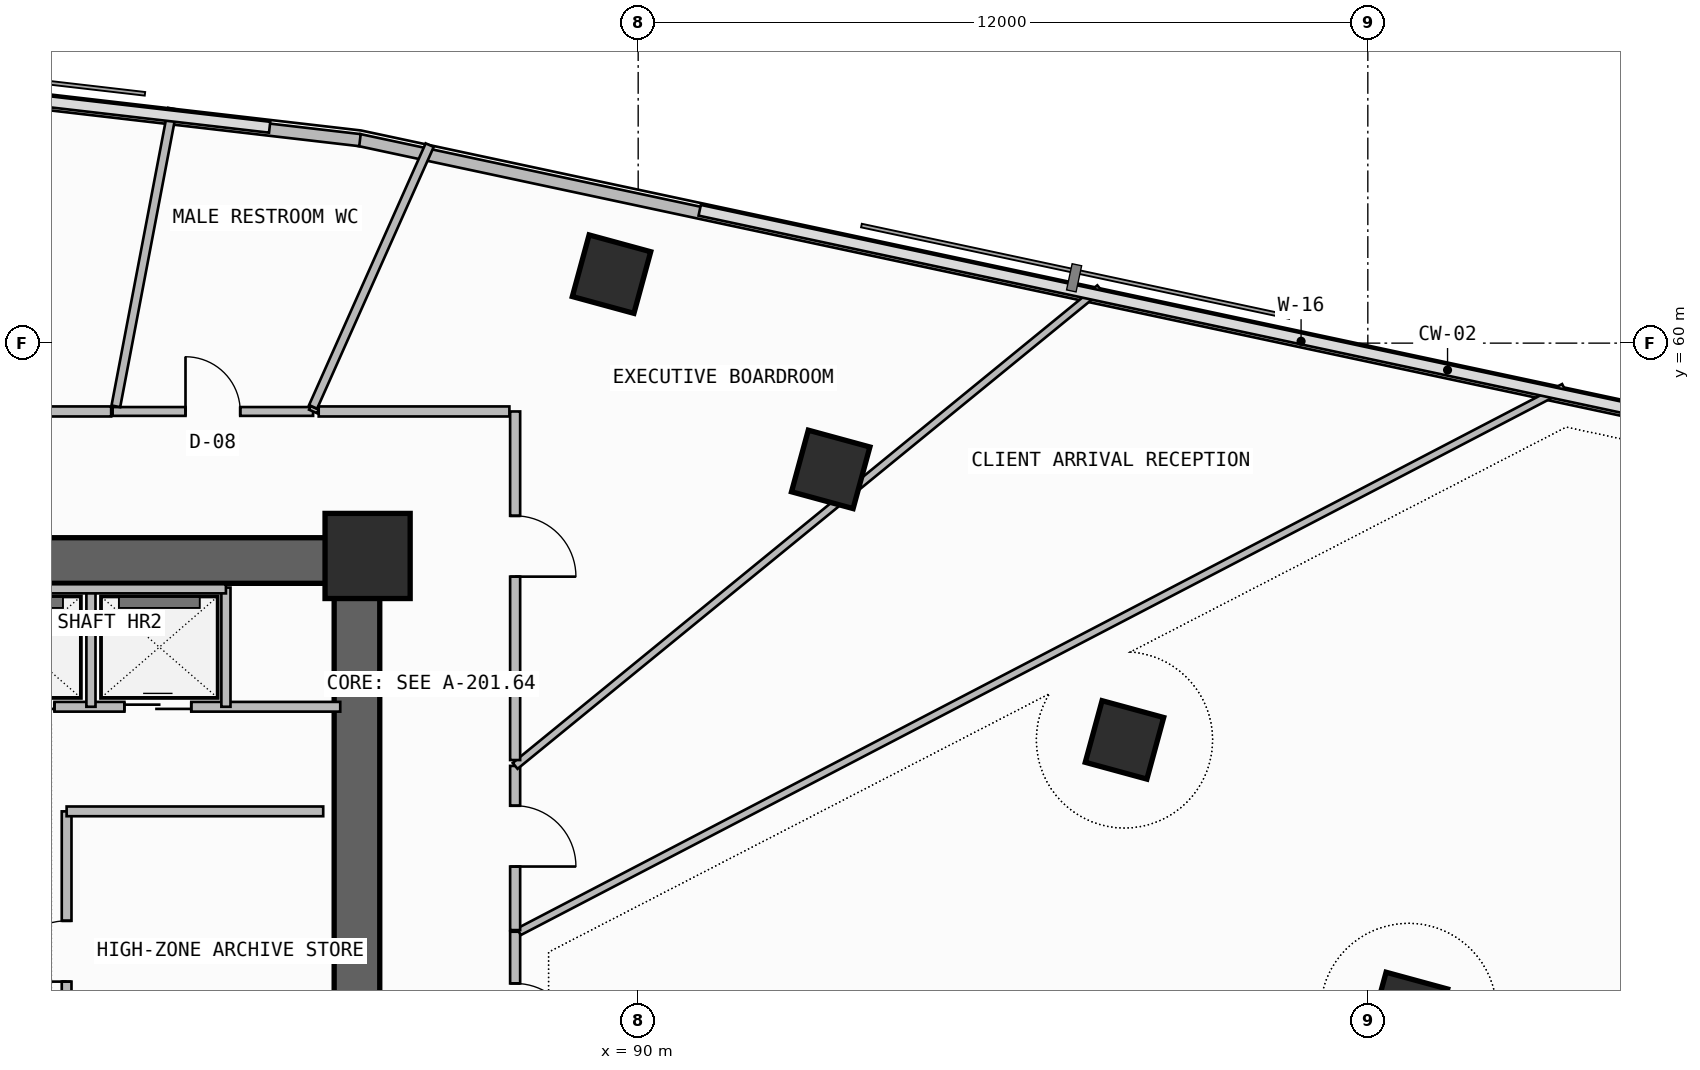
"""IFC4 building model, lengths in metres.
Left out: names, types, materials, properties, quantities, classifications, styles, units other than length and angle.
Written with IfcOpenShell. Run it as: python <this file> out.ifc"""

import sys

from ifc_helpers import new_model, si_unit, direction, frame, frame_2d, origin, origin_2d, place, context, subcontext, project, spatial, rectangle, extrude, element, fill, save


model = new_model("IFC4")
c1 = context("Model", 3, precision=1e-05, world=origin(), true_north=direction((0.0, 1.0)))
c2 = subcontext(c1, "Body", "Model", "MODEL_VIEW")
j1 = project(units=[si_unit("LENGTHUNIT", "METRE"), si_unit("PLANEANGLEUNIT", "RADIAN")], contexts=[c1])
p1 = place(None, origin())
s1 = spatial("IfcSite", under=j1, at=p1, CompositionType="ELEMENT")
p2 = place(p1, origin())
s2 = spatial("IfcBuilding", under=s1, at=p2, CompositionType="ELEMENT")
p3 = place(p2, frame((0.0, 0.0, 229.06)))
s3 = spatial("IfcBuildingStorey", under=s2, at=p3, CompositionType="ELEMENT", Elevation=229.06)
p4 = place(p3, frame((72.0, 56.425, -0.26), z_axis=(0.0, 0.0, 1.0), x_axis=(1.0, 0.0, 0.0)))
e1 = element("IfcWall", 1, at=p4, inside=s3, PredefinedType="SHEAR", context=c2, shape_type="SweptSolid", body=[
    extrude(rectangle(XDim=13.75, YDim=0.75, at=frame_2d((6.875, 0.0))), origin(), (0.0, 0.0, 1.0), 3.52),
])
p5 = place(p3, frame((85.375, 47.6, -0.26), z_axis=(0.0, 0.0, 1.0), x_axis=(0.0, 1.0, 0.0)))
e2 = element("IfcWall", 2, at=p5, inside=s3, PredefinedType="SHEAR", context=c2, shape_type="SweptSolid", body=[
    extrude(rectangle(XDim=8.45, YDim=0.75, at=frame_2d((4.225, 0.0))), origin(), (0.0, 0.0, 1.0), 3.52),
])
p6 = place(p3, frame((85.55, 56.5, 0.0), z_axis=(0.0, 0.0, 1.0), x_axis=(1.0, 0.0, 0.0)))
e3 = element("IfcColumn", 3, at=p6, inside=s3, PredefinedType="COLUMN", context=c2, shape_type="SweptSolid", body=[
    extrude(rectangle(XDim=1.4, YDim=1.4, at=origin_2d()), origin(), (0.0, 0.0, 1.0), 3.52),
])
for number, where, z_axis, x_axis in (
    (4, (102.669, 49.01, 0.0), (0.0, 0.0, 1.0), (0.263, 0.965, 0.0)),
    (5, (97.998, 53.475, 0.0), (0.0, 0.0, 1.0), (0.263, 0.965, 0.0)),
    (6, (93.167, 57.924, 0.0), (0.0, 0.0, 1.0), (0.263, 0.965, 0.0)),
    (7, (89.562, 61.135, 0.0), (0.0, 0.0, 1.0), (0.263, 0.965, 0.0)),
):
    element("IfcColumn", number, at=place(p3, frame(where, z_axis=z_axis, x_axis=x_axis)), inside=s3, PredefinedType="COLUMN", context=c2, shape_type="SweptSolid", body=[
        extrude(rectangle(XDim=1.05, YDim=1.05, at=origin_2d()), origin(), (0.0, 0.0, 1.0), 3.52),
    ])
p7 = place(p3, frame((104.791, 47.25, 0.0), z_axis=(0.0, 0.0, 1.0), x_axis=(0.868193423982, 0.496225934987, 0.0)))
e8 = element("IfcWall", 8, at=p7, inside=s3, PredefinedType="SOLIDWALL", context=c2, shape_type="SweptSolid", body=[
    extrude(rectangle(XDim=12.995, YDim=0.42, at=frame_2d((6.498, 0.0))), origin(), (0.0, 0.0, 1.0), 2.237),
])
p8 = place(p7, frame((7.31, 0.0, 0.957)))
e9 = element("IfcOpeningElement", 9, at=p8, cuts=e8, PredefinedType="OPENING", context=c2, shape_type="SweptSolid", body=[
    extrude(rectangle(XDim=2.4, YDim=1.2, at=frame_2d((1.2, 0.6))), frame((0.0, 0.22, 0.0), z_axis=(0.0, -1.0, 0.0), x_axis=(1.0, 0.0, 0.0)), (0.0, 0.0, 1.0), 0.44),
])
p9 = place(p3, frame((116.396, 56.722, 0.0), z_axis=(0.0, 0.0, 1.0), x_axis=(-0.977936620644, 0.208901809478, 0.0)))
e10 = element("IfcWall", 10, at=p9, inside=s3, PredefinedType="PARAPET", context=c2, shape_type="SweptSolid", body=[
    extrude(rectangle(XDim=31.685, YDim=0.2, at=frame_2d((15.843, 0.0))), origin(), (0.0, 0.0, 1.0), 1.15),
])
p10 = place(p3, frame((85.424, 63.338, 0.0), z_axis=(0.0, 0.0, 1.0), x_axis=(-0.993364714048, 0.115006716693, 0.0)))
e11 = element("IfcWall", 11, at=p10, inside=s3, PredefinedType="PARAPET", context=c2, shape_type="SweptSolid", body=[
    extrude(rectangle(XDim=26.302, YDim=0.2, at=frame_2d((13.151, 0.0))), origin(), (0.0, 0.0, 1.0), 1.15),
])
p11 = place(p3, frame((80.6, 47.7, 0.0), z_axis=(0.0, 0.0, 1.0), x_axis=(0.0, 1.0, 0.0)))
e12 = element("IfcWall", 12, at=p11, inside=s3, PredefinedType="SOLIDWALL", context=c2, shape_type="SweptSolid", body=[
    extrude(rectangle(XDim=4.6, YDim=0.16, at=frame_2d((2.3, 0.0))), origin(), (0.0, 0.0, 1.0), 3.26),
])
p12 = place(p11, frame((1.8, 0.0, 0.0)))
e13 = element("IfcOpeningElement", 13, at=p12, cuts=e12, PredefinedType="OPENING", context=c2, shape_type="SweptSolid", body=[
    extrude(rectangle(XDim=1.0, YDim=2.2, at=frame_2d((0.5, 1.1))), frame((0.0, 0.09, 0.0), z_axis=(0.0, -1.0, 0.0), x_axis=(1.0, 0.0, 0.0)), (0.0, 0.0, 1.0), 0.18),
])
p13 = place(p3, frame((80.6, 52.3, 0.0), z_axis=(0.0, 0.0, 1.0), x_axis=(1.0, 0.0, 0.0)))
e14 = element("IfcWall", 14, at=p13, inside=s3, PredefinedType="SOLIDWALL", context=c2, shape_type="SweptSolid", body=[
    extrude(rectangle(XDim=4.22, YDim=0.16, at=frame_2d((2.11, 0.0))), origin(), (0.0, 0.0, 1.0), 3.26),
])
p14 = place(p3, frame((73.02, 54.02, 0.0), z_axis=(0.0, 0.0, 1.0), x_axis=(1.0, 0.0, 0.0)))
e15 = element("IfcWall", 15, at=p14, inside=s3, PredefinedType="SOLIDWALL", context=c2, shape_type="SweptSolid", body=[
    extrude(rectangle(XDim=12.08, YDim=0.16, at=frame_2d((6.04, 0.0))), origin(), (0.0, 0.0, 1.0), 3.26),
])
p15 = place(p14, frame((4.03, 0.0, 0.0)))
e16 = element("IfcOpeningElement", 16, at=p15, cuts=e15, PredefinedType="OPENING", context=c2, shape_type="SweptSolid", body=[
    extrude(rectangle(XDim=1.1, YDim=2.25, at=frame_2d((0.55, 1.125))), frame((0.0, 0.09, 0.0), z_axis=(0.0, -1.0, 0.0), x_axis=(1.0, 0.0, 0.0)), (0.0, 0.0, 1.0), 0.18),
])
p16 = place(p14, frame((6.28, 0.0, 0.0)))
e17 = element("IfcOpeningElement", 17, at=p16, cuts=e15, PredefinedType="OPENING", context=c2, shape_type="SweptSolid", body=[
    extrude(rectangle(XDim=1.1, YDim=2.25, at=frame_2d((0.55, 1.125))), frame((0.0, 0.09, 0.0), z_axis=(0.0, -1.0, 0.0), x_axis=(1.0, 0.0, 0.0)), (0.0, 0.0, 1.0), 0.18),
])
p17 = place(p14, frame((8.53, 0.0, 0.0)))
e18 = element("IfcOpeningElement", 18, at=p17, cuts=e15, PredefinedType="OPENING", context=c2, shape_type="SweptSolid", body=[
    extrude(rectangle(XDim=1.1, YDim=2.25, at=frame_2d((0.55, 1.125))), frame((0.0, 0.09, 0.0), z_axis=(0.0, -1.0, 0.0), x_axis=(1.0, 0.0, 0.0)), (0.0, 0.0, 1.0), 0.18),
])
p18 = place(p3, frame((81.0, 54.02, 0.0), z_axis=(0.0, 0.0, 1.0), x_axis=(0.0, 1.0, 0.0)))
e19 = element("IfcWall", 19, at=p18, inside=s3, PredefinedType="PLUMBINGWALL", context=c2, shape_type="SweptSolid", body=[
    extrude(rectangle(XDim=1.96, YDim=0.15, at=frame_2d((0.98, 0.0))), origin(), (0.0, 0.0, 1.0), 3.26),
])
p19 = place(p3, frame((83.22, 54.02, 0.0), z_axis=(0.0, 0.0, 1.0), x_axis=(0.0, 1.0, 0.0)))
e20 = element("IfcWall", 20, at=p19, inside=s3, PredefinedType="SOLIDWALL", context=c2, shape_type="SweptSolid", body=[
    extrude(rectangle(XDim=1.96, YDim=0.15, at=frame_2d((0.98, 0.0))), origin(), (0.0, 0.0, 1.0), 3.26),
])
p20 = place(p3, frame((76.52, 55.96, 0.0), z_axis=(0.0, 0.0, 1.0), x_axis=(1.0, 0.0, 0.0)))
e21 = element("IfcWall", 21, at=p20, inside=s3, PredefinedType="SOLIDWALL", context=c2, shape_type="SweptSolid", body=[
    extrude(rectangle(XDim=6.7, YDim=0.15, at=frame_2d((3.35, 0.0))), origin(), (0.0, 0.0, 1.0), 3.26),
])
p21 = place(p3, frame((87.976, 47.62, 0.0), z_axis=(0.0, 0.0, 1.0), x_axis=(0.0, 1.0, 0.0)))
e22 = element("IfcWall", 22, at=p21, inside=s3, PredefinedType="PARTITIONING", context=c2, shape_type="SweptSolid", body=[
    extrude(rectangle(XDim=2.7, YDim=0.165, at=frame_2d((1.35, 0.0))), origin(), (0.0, 0.0, 1.0), 3.26),
])
p22 = place(p21, frame((0.85, 0.0, 0.0)))
e23 = element("IfcOpeningElement", 23, at=p22, cuts=e22, PredefinedType="OPENING", context=c2, shape_type="SweptSolid", body=[
    extrude(rectangle(XDim=1.0, YDim=2.2, at=frame_2d((0.5, 1.1))), frame((0.0, 0.093, 0.0), z_axis=(0.0, -1.0, 0.0), x_axis=(1.0, 0.0, 0.0)), (0.0, 0.0, 1.0), 0.185),
])
p23 = place(p3, frame((88.04, 50.32, 0.0), z_axis=(0.0, 0.0, 1.0), x_axis=(0.886887733798, 0.461985008023, 0.0)))
e24 = element("IfcWall", 24, at=p23, inside=s3, PredefinedType="PARTITIONING", context=c2, shape_type="SweptSolid", body=[
    extrude(rectangle(XDim=19.376, YDim=0.125, at=frame_2d((9.688, 0.0))), origin(), (0.0, 0.0, 1.0), 2.237),
])
p24 = place(p3, frame((87.976, 50.347, 0.0), z_axis=(0.0, 0.0, 1.0), x_axis=(0.0, 1.0, 0.0)))
e25 = element("IfcWall", 25, at=p24, inside=s3, PredefinedType="PARTITIONING", context=c2, shape_type="SweptSolid", body=[
    extrude(rectangle(XDim=2.7, YDim=0.165, at=frame_2d((1.35, 0.0))), origin(), (0.0, 0.0, 1.0), 3.26),
])
p25 = place(p24, frame((1.045, 0.0, 0.0)))
e26 = element("IfcOpeningElement", 26, at=p25, cuts=e25, PredefinedType="OPENING", context=c2, shape_type="SweptSolid", body=[
    extrude(rectangle(XDim=1.0, YDim=2.2, at=frame_2d((0.5, 1.1))), frame((0.0, 0.093, 0.0), z_axis=(0.0, -1.0, 0.0), x_axis=(1.0, 0.0, 0.0)), (0.0, 0.0, 1.0), 0.185),
])
p26 = place(p3, frame((87.976, 53.048, 0.0), z_axis=(0.0, 0.0, 1.0), x_axis=(0.774410079036, 0.632683988645, 0.0)))
e27 = element("IfcWall", 27, at=p26, inside=s3, PredefinedType="PARTITIONING", context=c2, shape_type="SweptSolid", body=[
    extrude(rectangle(XDim=12.415, YDim=0.125, at=frame_2d((6.208, 0.0))), origin(), (0.0, 0.0, 1.0), 2.237),
])
p27 = place(p3, frame((84.654, 58.876, 0.0), z_axis=(0.0, 0.0, 1.0), x_axis=(-1.0, 0.0, 0.0)))
e28 = element("IfcWall", 28, at=p27, inside=s3, PredefinedType="PARTITIONING", context=c2, shape_type="SweptSolid", body=[
    extrude(rectangle(XDim=3.297, YDim=0.145, at=frame_2d((1.648, 0.0))), origin(), (0.0, 0.0, 1.0), 3.26),
])
p28 = place(p27, frame((1.198, 0.0, 0.0)))
e29 = element("IfcOpeningElement", 29, at=p28, cuts=e28, PredefinedType="OPENING", context=c2, shape_type="SweptSolid", body=[
    extrude(rectangle(XDim=0.9, YDim=2.1, at=frame_2d((0.45, 1.05))), frame((0.0, 0.083, 0.0), z_axis=(0.0, -1.0, 0.0), x_axis=(1.0, 0.0, 0.0)), (0.0, 0.0, 1.0), 0.165),
])
p29 = place(p3, frame((84.68, 58.936, 0.0), z_axis=(0.0, 0.0, 1.0), x_axis=(-0.403364333628, -0.915039460546, 0.0)))
e30 = element("IfcWall", 30, at=p29, inside=s3, PredefinedType="PARTITIONING", context=c2, shape_type="SweptSolid", body=[
    extrude(rectangle(XDim=0.065, YDim=0.145, at=frame_2d((0.033, 0.0))), origin(), (0.0, 0.0, 1.0), 3.26),
])
p30 = place(p3, frame((86.571, 63.256, 0.0), z_axis=(0.0, 0.0, 1.0), x_axis=(-0.406936332394, -0.913456524077, 0.0)))
e31 = element("IfcWall", 31, at=p30, inside=s3, PredefinedType="PARTITIONING", context=c2, shape_type="SweptSolid", body=[
    extrude(rectangle(XDim=4.712, YDim=0.145, at=frame_2d((2.356, 0.0))), origin(), (0.0, 0.0, 1.0), 3.26),
])
p31 = place(p3, frame((81.41, 58.961, 0.0), z_axis=(0.0, 0.0, 1.0), x_axis=(0.187053573784, 0.982349713969, 0.0)))
e32 = element("IfcWall", 32, at=p31, inside=s3, PredefinedType="PARTITIONING", context=c2, shape_type="SweptSolid", body=[
    extrude(rectangle(XDim=4.983, YDim=0.145, at=frame_2d((2.492, 0.0))), origin(), (0.0, 0.0, 1.0), 3.26),
])
p32 = place(p3, frame((87.976, 53.144, 0.0), z_axis=(0.0, 0.0, 1.0), x_axis=(0.0, 1.0, 0.0)))
e33 = element("IfcWall", 33, at=p32, inside=s3, PredefinedType="PARTITIONING", context=c2, shape_type="SweptSolid", body=[
    extrude(rectangle(XDim=5.733, YDim=0.165, at=frame_2d((2.866, 0.0))), origin(), (0.0, 0.0, 1.0), 2.237),
])
p33 = place(p32, frame((3.016, 0.0, 0.0)))
e34 = element("IfcOpeningElement", 34, at=p33, cuts=e33, PredefinedType="OPENING", context=c2, shape_type="SweptSolid", body=[
    extrude(rectangle(XDim=1.0, YDim=2.2, at=frame_2d((0.5, 1.1))), frame((0.0, 0.093, 0.0), z_axis=(0.0, -1.0, 0.0), x_axis=(1.0, 0.0, 0.0)), (0.0, 0.0, 1.0), 0.185),
])
p34 = place(p3, frame((87.882, 58.876, 0.0), z_axis=(0.0, 0.0, 1.0), x_axis=(-1.0, 0.0, 0.0)))
e35 = element("IfcWall", 35, at=p34, inside=s3, PredefinedType="PARTITIONING", context=c2, shape_type="SweptSolid", body=[
    extrude(rectangle(XDim=3.136, YDim=0.165, at=frame_2d((1.568, 0.0))), origin(), (0.0, 0.0, 1.0), 2.237),
])
p35 = place(p3, frame((81.333, 58.876, 0.0), z_axis=(0.0, 0.0, 1.0), x_axis=(-1.0, 0.0, 0.0)))
e36 = element("IfcWall", 36, at=p35, inside=s3, PredefinedType="PARTITIONING", context=c2, shape_type="SweptSolid", body=[
    extrude(rectangle(XDim=1.588, YDim=0.165, at=frame_2d((0.794, 0.0))), origin(), (0.0, 0.0, 1.0), 3.26),
])
p36 = place(p12, origin())
e37 = element("IfcDoor", 37, at=p36, inside=s3, OperationType="SINGLE_SWING_LEFT", PredefinedType="DOOR", context=c2, shape_type="SweptSolid", body=[
    extrude(rectangle(XDim=1.0, YDim=2.2, at=frame_2d((0.5, 1.1))), frame((0.0, 0.025, 0.0), z_axis=(0.0, -1.0, 0.0), x_axis=(1.0, 0.0, 0.0)), (0.0, 0.0, 1.0), 0.05),
])
fill(e13, e37)
p37 = place(p16, origin())
e38 = element("IfcDoor", 38, at=p37, inside=s3, OperationType="DOUBLE_DOOR_SLIDING", PredefinedType="DOOR", context=c2, shape_type="SweptSolid", body=[
    extrude(rectangle(XDim=1.1, YDim=2.25, at=frame_2d((0.55, 1.125))), frame((0.0, 0.025, 0.0), z_axis=(0.0, -1.0, 0.0), x_axis=(1.0, 0.0, 0.0)), (0.0, 0.0, 1.0), 0.05),
])
fill(e17, e38)
p38 = place(p17, origin())
e39 = element("IfcDoor", 39, at=p38, inside=s3, OperationType="DOUBLE_DOOR_SLIDING", PredefinedType="DOOR", context=c2, shape_type="SweptSolid", body=[
    extrude(rectangle(XDim=1.1, YDim=2.25, at=frame_2d((0.55, 1.125))), frame((0.0, 0.025, 0.0), z_axis=(0.0, -1.0, 0.0), x_axis=(1.0, 0.0, 0.0)), (0.0, 0.0, 1.0), 0.05),
])
fill(e18, e39)
p39 = place(p22, frame((1.0, 0.0, 0.0), z_axis=(0.0, 0.0, 1.0), x_axis=(-1.0, 0.0, 0.0)))
e40 = element("IfcDoor", 40, at=p39, inside=s3, OperationType="SINGLE_SWING_RIGHT", PredefinedType="DOOR", context=c2, shape_type="SweptSolid", body=[
    extrude(rectangle(XDim=1.0, YDim=2.2, at=frame_2d((0.5, 1.1))), frame((0.0, 0.025, 0.0), z_axis=(0.0, -1.0, 0.0), x_axis=(1.0, 0.0, 0.0)), (0.0, 0.0, 1.0), 0.05),
])
fill(e23, e40)
p40 = place(p25, frame((1.0, 0.0, 0.0), z_axis=(0.0, 0.0, 1.0), x_axis=(-1.0, 0.0, 0.0)))
e41 = element("IfcDoor", 41, at=p40, inside=s3, OperationType="SINGLE_SWING_RIGHT", PredefinedType="DOOR", context=c2, shape_type="SweptSolid", body=[
    extrude(rectangle(XDim=1.0, YDim=2.2, at=frame_2d((0.5, 1.1))), frame((0.0, 0.025, 0.0), z_axis=(0.0, -1.0, 0.0), x_axis=(1.0, 0.0, 0.0)), (0.0, 0.0, 1.0), 0.05),
])
fill(e26, e41)
p41 = place(p28, frame((0.9, 0.0, 0.0), z_axis=(0.0, 0.0, 1.0), x_axis=(-1.0, 0.0, 0.0)))
e42 = element("IfcDoor", 42, at=p41, inside=s3, OperationType="SINGLE_SWING_LEFT", PredefinedType="DOOR", context=c2, shape_type="SweptSolid", body=[
    extrude(rectangle(XDim=0.9, YDim=2.1, at=frame_2d((0.45, 1.05))), frame((0.0, 0.025, 0.0), z_axis=(0.0, -1.0, 0.0), x_axis=(1.0, 0.0, 0.0)), (0.0, 0.0, 1.0), 0.05),
])
fill(e29, e42)
p42 = place(p33, frame((1.0, 0.0, 0.0), z_axis=(0.0, 0.0, 1.0), x_axis=(-1.0, 0.0, 0.0)))
e43 = element("IfcDoor", 43, at=p42, inside=s3, OperationType="SINGLE_SWING_RIGHT", PredefinedType="DOOR", context=c2, shape_type="SweptSolid", body=[
    extrude(rectangle(XDim=1.0, YDim=2.2, at=frame_2d((0.5, 1.1))), frame((0.0, 0.025, 0.0), z_axis=(0.0, -1.0, 0.0), x_axis=(1.0, 0.0, 0.0)), (0.0, 0.0, 1.0), 0.05),
])
fill(e34, e43)
save(model, sys.argv[1])
